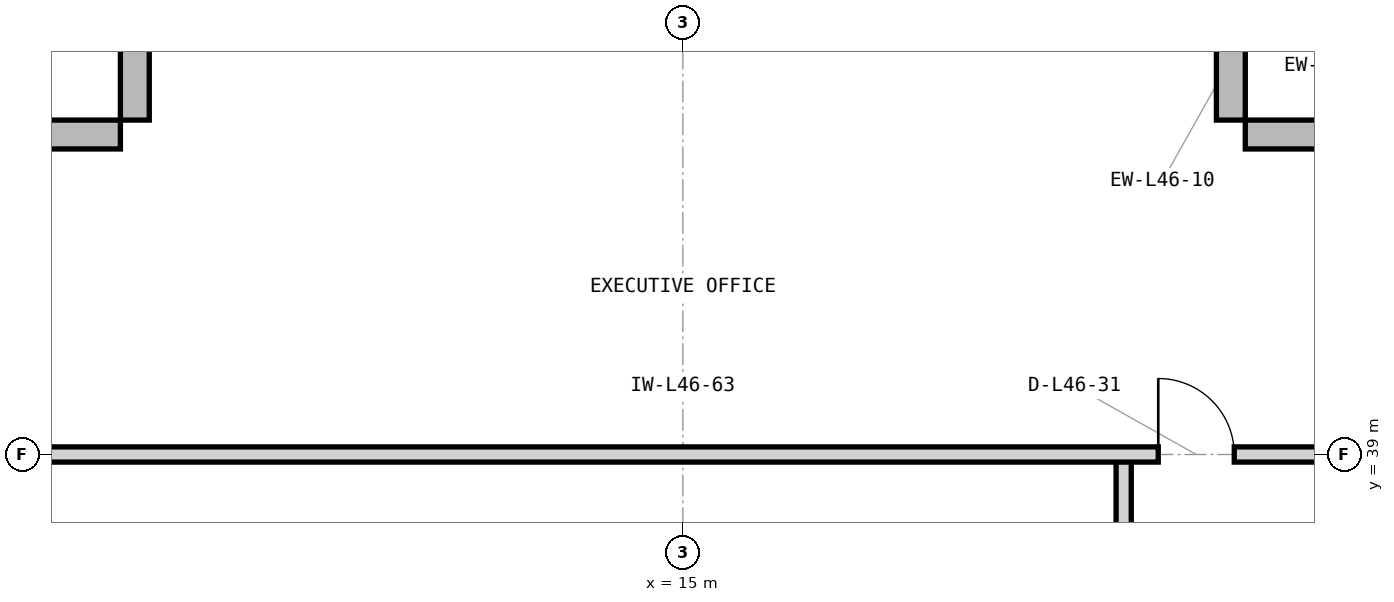
"""IFC4 building model, lengths in metres.
Left out: names, types, materials, properties, quantities, classifications, styles, units other than length and angle.
Written with IfcOpenShell. Run it as: python <this file> out.ifc"""

import sys

from ifc_helpers import new_model, si_unit, direction, frame, frame_2d, origin, place, context, subcontext, project, spatial, rectangle, extrude, element, fill, save


model = new_model("IFC4")
c1 = context("Model", 3, precision=1e-05, world=origin(), true_north=direction((0.0, 1.0)))
c2 = subcontext(c1, "Body", "Model", "MODEL_VIEW")
j1 = project(units=[si_unit("LENGTHUNIT", "METRE"), si_unit("PLANEANGLEUNIT", "RADIAN")], contexts=[c1])
p1 = place(None, origin())
s1 = spatial("IfcSite", under=j1, at=p1, CompositionType="ELEMENT")
p2 = place(p1, origin())
s2 = spatial("IfcBuilding", under=s1, at=p2, CompositionType="ELEMENT")
p3 = place(p2, frame((0.0, 0.0, 191.7)))
s3 = spatial("IfcBuildingStorey", under=s2, at=p3, CompositionType="ELEMENT", Elevation=191.7)
for number, where, z_axis, x_axis in (
    (1, (24.0, 43.21, 0.0), (0.0, 0.0, 1.0), (-1.0, 0.0, 0.0)),
    (2, (22.21, 43.4, 0.0), (0.0, 0.0, 1.0), (0.0, 1.0, 0.0)),
    (3, (7.79, 45.0, 0.0), (0.0, 0.0, 1.0), (0.0, -1.0, 0.0)),
    (4, (7.6, 43.21, 0.0), (0.0, 0.0, 1.0), (-1.0, 0.0, 0.0)),
):
    element("IfcWall", number, at=place(p3, frame(where, z_axis=z_axis, x_axis=x_axis)), inside=s3, PredefinedType="STANDARD", context=c2, shape_type="SweptSolid", body=[
        extrude(rectangle(XDim=1.6, YDim=0.38, at=frame_2d((0.8, 0.0))), origin(), (0.0, 0.0, 1.0), 3.7),
    ])
p4 = place(p3, frame((20.8, 36.25, 0.0), z_axis=(0.0, 0.0, 1.0), x_axis=(0.0, 1.0, 0.0)))
e5 = element("IfcWall", 5, at=p4, inside=s3, PredefinedType="PARTITIONING", context=c2, shape_type="SweptSolid", body=[
    extrude(rectangle(XDim=2.75, YDim=0.2, at=frame_2d((1.375, 0.0))), origin(), (0.0, 0.0, 1.0), 3.69),
])
p5 = place(p4, frame((0.6, 0.0, 0.0)))
e6 = element("IfcOpeningElement", 6, at=p5, cuts=e5, PredefinedType="OPENING", context=c2, shape_type="SweptSolid", body=[
    extrude(rectangle(XDim=1.0, YDim=2.15, at=frame_2d((0.5, 1.075))), frame((0.0, 0.11, 0.0), z_axis=(0.0, -1.0, 0.0), x_axis=(1.0, 0.0, 0.0)), (0.0, 0.0, 1.0), 0.22),
])
p6 = place(p3, frame((6.18, 39.0, 0.0), z_axis=(0.0, 0.0, 1.0), x_axis=(1.0, 0.0, 0.0)))
e7 = element("IfcWall", 7, at=p6, inside=s3, PredefinedType="PARTITIONING", context=c2, shape_type="SweptSolid", body=[
    extrude(rectangle(XDim=17.64, YDim=0.2, at=frame_2d((8.82, 0.0))), origin(), (0.0, 0.0, 1.0), 3.073),
])
p7 = place(p6, frame((15.075, 0.0, 0.0)))
e8 = element("IfcOpeningElement", 8, at=p7, cuts=e7, PredefinedType="OPENING", context=c2, shape_type="SweptSolid", body=[
    extrude(rectangle(XDim=1.0, YDim=2.15, at=frame_2d((0.5, 1.075))), frame((0.0, 0.11, 0.0), z_axis=(0.0, -1.0, 0.0), x_axis=(1.0, 0.0, 0.0)), (0.0, 0.0, 1.0), 0.22),
])
p8 = place(p7, origin())
e9 = element("IfcDoor", 9, at=p8, inside=s3, OperationType="SINGLE_SWING_LEFT", PredefinedType="DOOR", context=c2, shape_type="SweptSolid", body=[
    extrude(rectangle(XDim=1.0, YDim=2.15, at=frame_2d((0.5, 1.075))), frame((0.0, 0.025, 0.0), z_axis=(0.0, -1.0, 0.0), x_axis=(1.0, 0.0, 0.0)), (0.0, 0.0, 1.0), 0.05),
])
fill(e8, e9)
save(model, sys.argv[1])
